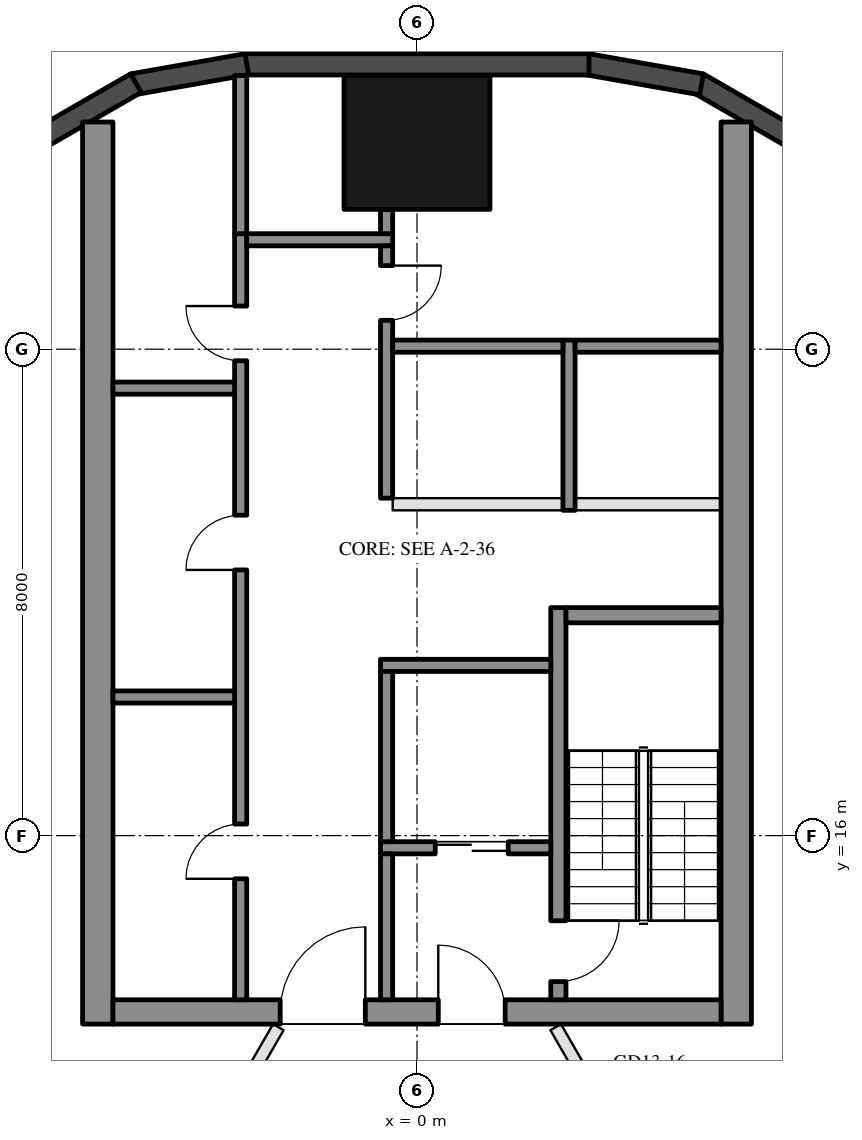
"""IFC4 building model, lengths in metres.
Left out: names, types, materials, properties, quantities, classifications, styles, units other than length and angle.
Written with IfcOpenShell. Run it as: python <this file> out.ifc"""

import sys

from ifc_helpers import new_model, si_unit, direction, frame, frame_2d, origin, origin_2d, place, context, subcontext, project, spatial, rectangle, hollow_rectangle, extrude, element, fill, save


model = new_model("IFC4")
c1 = context("Model", 3, precision=1e-05, world=origin(), true_north=direction((0.0, 1.0)))
c2 = subcontext(c1, "Body", "Model", "MODEL_VIEW")
j1 = project(units=[si_unit("LENGTHUNIT", "METRE"), si_unit("PLANEANGLEUNIT", "RADIAN")], contexts=[c1])
p1 = place(None, origin())
s1 = spatial("IfcSite", under=j1, at=p1, CompositionType="ELEMENT")
p2 = place(p1, origin())
s2 = spatial("IfcBuilding", under=s1, at=p2, CompositionType="ELEMENT")
p3 = place(p2, frame((0.0, 0.0, 157.7)))
s3 = spatial("IfcBuildingStorey", under=s2, at=p3, CompositionType="ELEMENT", Elevation=157.7)
p4 = place(p3, frame((0.0, 27.4, 0.0), z_axis=(0.0, 0.0, 1.0), x_axis=(1.0, 0.0, 0.0)))
e1 = element("IfcColumn", 1, at=p4, inside=s3, PredefinedType="COLUMN", context=c2, shape_type="SweptSolid", body=[
    extrude(hollow_rectangle(XDim=2.4, YDim=2.2, WallThickness=0.06, at=origin_2d()), origin(), (0.0, 0.0, 1.0), 3.7),
])
for number, where, z_axis, x_axis in (
    (2, (6.277, 27.422, 0.0), (0.0, 0.0, 1.0), (-0.866, 0.5, 0.0)),
    (3, (4.68, 28.356, 0.0), (0.0, 0.0, 1.0), (-0.985, 0.174, 0.0)),
):
    element("IfcWall", number, at=place(p3, frame(where, z_axis=z_axis, x_axis=x_axis)), inside=s3, PredefinedType="SOLIDWALL", context=c2, shape_type="SweptSolid", body=[
        extrude(rectangle(XDim=1.91, YDim=0.35, at=frame_2d((0.955, 0.0))), origin(), (0.0, 0.0, 1.0), 3.55),
    ])
p5 = place(p3, frame((2.829, 28.685, 0.0), z_axis=(0.0, 0.0, 1.0), x_axis=(-1.0, 0.0, 0.0)))
e4 = element("IfcWall", 4, at=p5, inside=s3, PredefinedType="SOLIDWALL", context=c2, shape_type="SweptSolid", body=[
    extrude(rectangle(XDim=5.658, YDim=0.35, at=frame_2d((2.829, 0.0))), origin(), (0.0, 0.0, 1.0), 3.55),
])
for number, where, z_axis, x_axis in (
    (5, (-2.799, 28.688, 0.0), (0.0, 0.0, 1.0), (-0.985, -0.174, 0.0)),
    (6, (-4.623, 28.377, 0.0), (0.0, 0.0, 1.0), (-0.866, -0.5, 0.0)),
):
    element("IfcWall", number, at=place(p3, frame(where, z_axis=z_axis, x_axis=x_axis)), inside=s3, PredefinedType="SOLIDWALL", context=c2, shape_type="SweptSolid", body=[
        extrude(rectangle(XDim=1.91, YDim=0.35, at=frame_2d((0.955, 0.0))), origin(), (0.0, 0.0, 1.0), 3.55),
    ])
for number, where, z_axis, x_axis in (
    (7, (5.25, 12.9, 0.0), (0.0, 0.0, 1.0), (0.0, 1.0, 0.0)),
    (8, (-5.25, 12.9, 0.0), (0.0, 0.0, 1.0), (0.0, 1.0, 0.0)),
):
    element("IfcWall", number, at=place(p3, frame(where, z_axis=z_axis, x_axis=x_axis)), inside=s3, PredefinedType="SHEAR", context=c2, shape_type="SweptSolid", body=[
        extrude(rectangle(XDim=14.837, YDim=0.5, at=frame_2d((7.418, 0.0))), origin(), (0.0, 0.0, 1.0), 3.5),
    ])
p6 = place(p3, frame((5.0, 13.1, 0.0), z_axis=(0.0, 0.0, 1.0), x_axis=(-1.0, 0.0, 0.0)))
e9 = element("IfcWall", 9, at=p6, inside=s3, PredefinedType="SHEAR", context=c2, shape_type="SweptSolid", body=[
    extrude(rectangle(XDim=10.0, YDim=0.4, at=frame_2d((5.0, 0.0))), origin(), (0.0, 0.0, 1.0), 3.5),
])
p7 = place(p6, frame((3.55, 0.0, 0.0)))
e10 = element("IfcOpeningElement", 10, at=p7, cuts=e9, PredefinedType="OPENING", context=c2, shape_type="SweptSolid", body=[
    extrude(rectangle(XDim=1.1, YDim=2.1, at=frame_2d((0.55, 1.05))), frame((0.0, 0.21, 0.0), z_axis=(0.0, -1.0, 0.0), x_axis=(1.0, 0.0, 0.0)), (0.0, 0.0, 1.0), 0.42),
])
p8 = place(p6, frame((5.85, 0.0, 0.0)))
e11 = element("IfcOpeningElement", 11, at=p8, cuts=e9, PredefinedType="OPENING", context=c2, shape_type="SweptSolid", body=[
    extrude(rectangle(XDim=1.4, YDim=2.1, at=frame_2d((0.7, 1.05))), frame((0.0, 0.21, 0.0), z_axis=(0.0, -1.0, 0.0), x_axis=(1.0, 0.0, 0.0)), (0.0, 0.0, 1.0), 0.42),
])
p9 = place(p3, frame((2.325, 13.3, 0.0), z_axis=(0.0, 0.0, 1.0), x_axis=(0.0, 1.0, 0.0)))
e12 = element("IfcWall", 12, at=p9, inside=s3, PredefinedType="SHEAR", context=c2, shape_type="SweptSolid", body=[
    extrude(rectangle(XDim=6.45, YDim=0.25, at=frame_2d((3.225, 0.0))), origin(), (0.0, 0.0, 1.0), 3.5),
])
p10 = place(p9, frame((0.3, 0.0, 0.0)))
e13 = element("IfcOpeningElement", 13, at=p10, cuts=e12, PredefinedType="OPENING", context=c2, shape_type="SweptSolid", body=[
    extrude(rectangle(XDim=1.0, YDim=2.1, at=frame_2d((0.5, 1.05))), frame((0.0, 0.135, 0.0), z_axis=(0.0, -1.0, 0.0), x_axis=(1.0, 0.0, 0.0)), (0.0, 0.0, 1.0), 0.27),
])
p11 = place(p3, frame((5.0, 19.625, 0.0), z_axis=(0.0, 0.0, 1.0), x_axis=(-1.0, 0.0, 0.0)))
e14 = element("IfcWall", 14, at=p11, inside=s3, PredefinedType="SHEAR", context=c2, shape_type="SweptSolid", body=[
    extrude(rectangle(XDim=2.55, YDim=0.25, at=frame_2d((1.275, 0.0))), origin(), (0.0, 0.0, 1.0), 3.5),
])
p12 = place(p3, frame((2.2, 18.8, 0.0), z_axis=(0.0, 0.0, 1.0), x_axis=(-1.0, 0.0, 0.0)))
e15 = element("IfcWall", 15, at=p12, inside=s3, PredefinedType="SHEAR", context=c2, shape_type="SweptSolid", body=[
    extrude(rectangle(XDim=2.8, YDim=0.2, at=frame_2d((1.4, 0.0))), origin(), (0.0, 0.0, 1.0), 3.5),
])
p13 = place(p3, frame((2.2, 15.8, 0.0), z_axis=(0.0, 0.0, 1.0), x_axis=(-1.0, 0.0, 0.0)))
e16 = element("IfcWall", 16, at=p13, inside=s3, PredefinedType="SHEAR", context=c2, shape_type="SweptSolid", body=[
    extrude(rectangle(XDim=2.8, YDim=0.2, at=frame_2d((1.4, 0.0))), origin(), (0.0, 0.0, 1.0), 3.5),
])
p14 = place(p13, frame((0.7, 0.0, 0.0)))
e17 = element("IfcOpeningElement", 17, at=p14, cuts=e16, PredefinedType="OPENING", context=c2, shape_type="SweptSolid", body=[
    extrude(rectangle(XDim=1.2, YDim=2.1, at=frame_2d((0.6, 1.05))), frame((0.0, 0.11, 0.0), z_axis=(0.0, -1.0, 0.0), x_axis=(1.0, 0.0, 0.0)), (0.0, 0.0, 1.0), 0.22),
])
p15 = place(p3, frame((-0.5, 15.9, 0.0), z_axis=(0.0, 0.0, 1.0), x_axis=(0.0, 1.0, 0.0)))
e18 = element("IfcWall", 18, at=p15, inside=s3, PredefinedType="SHEAR", context=c2, shape_type="SweptSolid", body=[
    extrude(rectangle(XDim=2.8, YDim=0.2, at=frame_2d((1.4, 0.0))), origin(), (0.0, 0.0, 1.0), 3.5),
])
p16 = place(p3, frame((-0.5, 13.3, 0.0), z_axis=(0.0, 0.0, 1.0), x_axis=(0.0, 1.0, 0.0)))
e19 = element("IfcWall", 19, at=p16, inside=s3, PredefinedType="SHEAR", context=c2, shape_type="SweptSolid", body=[
    extrude(rectangle(XDim=2.4, YDim=0.2, at=frame_2d((1.2, 0.0))), origin(), (0.0, 0.0, 1.0), 3.5),
])
p17 = place(p3, frame((-2.9, 13.3, 0.0), z_axis=(0.0, 0.0, 1.0), x_axis=(0.0, 1.0, 0.0)))
e20 = element("IfcWall", 20, at=p17, inside=s3, PredefinedType="SHEAR", context=c2, shape_type="SweptSolid", body=[
    extrude(rectangle(XDim=12.6, YDim=0.2, at=frame_2d((6.3, 0.0))), origin(), (0.0, 0.0, 1.0), 3.5),
])
p18 = place(p17, frame((1.99, 0.0, 0.0)))
e21 = element("IfcOpeningElement", 21, at=p18, cuts=e20, PredefinedType="OPENING", context=c2, shape_type="SweptSolid", body=[
    extrude(rectangle(XDim=0.9, YDim=2.1, at=frame_2d((0.45, 1.05))), frame((0.0, 0.11, 0.0), z_axis=(0.0, -1.0, 0.0), x_axis=(1.0, 0.0, 0.0)), (0.0, 0.0, 1.0), 0.22),
])
p19 = place(p17, frame((7.07, 0.0, 0.0)))
e22 = element("IfcOpeningElement", 22, at=p19, cuts=e20, PredefinedType="OPENING", context=c2, shape_type="SweptSolid", body=[
    extrude(rectangle(XDim=0.9, YDim=2.1, at=frame_2d((0.45, 1.05))), frame((0.0, 0.11, 0.0), z_axis=(0.0, -1.0, 0.0), x_axis=(1.0, 0.0, 0.0)), (0.0, 0.0, 1.0), 0.22),
])
p20 = place(p17, frame((10.51, 0.0, 0.0)))
e23 = element("IfcOpeningElement", 23, at=p20, cuts=e20, PredefinedType="OPENING", context=c2, shape_type="SweptSolid", body=[
    extrude(rectangle(XDim=0.9, YDim=2.1, at=frame_2d((0.45, 1.05))), frame((0.0, 0.11, 0.0), z_axis=(0.0, -1.0, 0.0), x_axis=(1.0, 0.0, 0.0)), (0.0, 0.0, 1.0), 0.22),
])
p21 = place(p3, frame((-0.4, 25.8, 0.0), z_axis=(0.0, 0.0, 1.0), x_axis=(-1.0, 0.0, 0.0)))
e24 = element("IfcWall", 24, at=p21, inside=s3, PredefinedType="SHEAR", context=c2, shape_type="SweptSolid", body=[
    extrude(rectangle(XDim=2.4, YDim=0.2, at=frame_2d((1.2, 0.0))), origin(), (0.0, 0.0, 1.0), 3.5),
])
p22 = place(p3, frame((-0.5, 21.55, 0.0), z_axis=(0.0, 0.0, 1.0), x_axis=(0.0, 1.0, 0.0)))
e25 = element("IfcWall", 25, at=p22, inside=s3, PredefinedType="SHEAR", context=c2, shape_type="SweptSolid", body=[
    extrude(rectangle(XDim=4.15, YDim=0.2, at=frame_2d((2.075, 0.0))), origin(), (0.0, 0.0, 1.0), 3.5),
])
p23 = place(p22, frame((2.925, 0.0, 0.0)))
e26 = element("IfcOpeningElement", 26, at=p23, cuts=e25, PredefinedType="OPENING", context=c2, shape_type="SweptSolid", body=[
    extrude(rectangle(XDim=0.9, YDim=2.1, at=frame_2d((0.45, 1.05))), frame((0.0, 0.11, 0.0), z_axis=(0.0, -1.0, 0.0), x_axis=(1.0, 0.0, 0.0)), (0.0, 0.0, 1.0), 0.22),
])
for number, where, z_axis, x_axis in (
    (27, (-3.0, 18.28, 0.0), (0.0, 0.0, 1.0), (-1.0, 0.0, 0.0)),
    (28, (-3.0, 23.36, 0.0), (0.0, 0.0, 1.0), (-1.0, 0.0, 0.0)),
):
    element("IfcWall", number, at=place(p3, frame(where, z_axis=z_axis, x_axis=x_axis)), inside=s3, PredefinedType="SHEAR", context=c2, shape_type="SweptSolid", body=[
        extrude(rectangle(XDim=2.0, YDim=0.2, at=frame_2d((1.0, 0.0))), origin(), (0.0, 0.0, 1.0), 3.5),
    ])
p24 = place(p3, frame((-0.5, 25.9, 0.0), z_axis=(0.0, 0.0, 1.0), x_axis=(0.0, 1.0, 0.0)))
e29 = element("IfcWall", 29, at=p24, inside=s3, PredefinedType="SHEAR", context=c2, shape_type="SweptSolid", body=[
    extrude(rectangle(XDim=0.4, YDim=0.2, at=frame_2d((0.2, 0.0))), origin(), (0.0, 0.0, 1.0), 3.5),
])
p25 = place(p3, frame((-2.9, 25.9, 0.0), z_axis=(0.0, 0.0, 1.0), x_axis=(0.0, 1.0, 0.0)))
e30 = element("IfcWall", 30, at=p25, inside=s3, PredefinedType="SHEAR", context=c2, shape_type="SweptSolid", body=[
    extrude(rectangle(XDim=2.6, YDim=0.2, at=frame_2d((1.3, 0.0))), origin(), (0.0, 0.0, 1.0), 3.5),
])
p26 = place(p3, frame((2.5, 21.35, 0.0), z_axis=(0.0, 0.0, 1.0), x_axis=(0.0, 1.0, 0.0)))
e31 = element("IfcWall", 31, at=p26, inside=s3, PredefinedType="SHEAR", context=c2, shape_type="SweptSolid", body=[
    extrude(rectangle(XDim=2.8, YDim=0.2, at=frame_2d((1.4, 0.0))), origin(), (0.0, 0.0, 1.0), 3.5),
])
p27 = place(p3, frame((5.0, 24.05, 0.0), z_axis=(0.0, 0.0, 1.0), x_axis=(-1.0, 0.0, 0.0)))
e32 = element("IfcWall", 32, at=p27, inside=s3, PredefinedType="SHEAR", context=c2, shape_type="SweptSolid", body=[
    extrude(rectangle(XDim=2.4, YDim=0.2, at=frame_2d((1.2, 0.0))), origin(), (0.0, 0.0, 1.0), 3.5),
])
p28 = place(p3, frame((2.4, 24.05, 0.0), z_axis=(0.0, 0.0, 1.0), x_axis=(-1.0, 0.0, 0.0)))
e33 = element("IfcWall", 33, at=p28, inside=s3, PredefinedType="SHEAR", context=c2, shape_type="SweptSolid", body=[
    extrude(rectangle(XDim=2.8, YDim=0.2, at=frame_2d((1.4, 0.0))), origin(), (0.0, 0.0, 1.0), 3.5),
])
p29 = place(p3, frame((5.0, 21.45, 0.0), z_axis=(0.0, 0.0, 1.0), x_axis=(-1.0, 0.0, 0.0)))
e34 = element("IfcWall", 34, at=p29, inside=s3, PredefinedType="PARTITIONING", context=c2, shape_type="SweptSolid", body=[
    extrude(rectangle(XDim=2.4, YDim=0.2, at=frame_2d((1.2, 0.0))), origin(), (0.0, 0.0, 1.0), 3.5),
])
p30 = place(p3, frame((2.4, 21.45, 0.0), z_axis=(0.0, 0.0, 1.0), x_axis=(-1.0, 0.0, 0.0)))
e35 = element("IfcWall", 35, at=p30, inside=s3, PredefinedType="PARTITIONING", context=c2, shape_type="SweptSolid", body=[
    extrude(rectangle(XDim=2.8, YDim=0.2, at=frame_2d((1.4, 0.0))), origin(), (0.0, 0.0, 1.0), 3.5),
])
p31 = place(p3, frame((14.257, 13.866, 0.0), z_axis=(0.0, 0.0, 1.0), x_axis=(-0.916761733334, -0.399434505638, 0.0)))
e36 = element("IfcWall", 36, at=p31, inside=s3, PredefinedType="PARTITIONING", context=c2, shape_type="SweptSolid", body=[
    extrude(rectangle(XDim=11.05, YDim=0.2, at=frame_2d((5.525, 0.0))), origin(), (0.0, 0.0, 1.0), 3.06),
])
p32 = place(p3, frame((-13.672, 13.08, 0.0), z_axis=(0.0, 0.0, 1.0), x_axis=(0.912311972773, -0.409495866077, 0.0)))
e37 = element("IfcWall", 37, at=p32, inside=s3, PredefinedType="PARTITIONING", context=c2, shape_type="SweptSolid", body=[
    extrude(rectangle(XDim=10.132, YDim=0.2, at=frame_2d((5.066, 0.0))), origin(), (0.0, 0.0, 1.0), 3.06),
])
p33 = place(p3, frame((2.281, 12.85, 0.0), z_axis=(0.0, 0.0, 1.0), x_axis=(0.499991068497, -0.866030560329, 0.0)))
e38 = element("IfcWall", 38, at=p33, inside=s3, PredefinedType="PARTITIONING", context=c2, shape_type="SweptSolid", body=[
    extrude(rectangle(XDim=3.776, YDim=0.2, at=frame_2d((1.888, 0.0))), origin(), (0.0, 0.0, 1.0), 2.95),
])
p34 = place(p33, frame((1.388, 0.0, 0.0)))
e39 = element("IfcOpeningElement", 39, at=p34, cuts=e38, PredefinedType="OPENING", context=c2, shape_type="SweptSolid", body=[
    extrude(rectangle(XDim=1.0, YDim=2.1, at=frame_2d((0.5, 1.05))), frame((0.0, 0.11, 0.0), z_axis=(0.0, -1.0, 0.0), x_axis=(1.0, 0.0, 0.0)), (0.0, 0.0, 1.0), 0.22),
])
p35 = place(p3, frame((-4.469, 9.059, 0.0), z_axis=(0.0, 0.0, 1.0), x_axis=(0.499996027077, 0.86602769754, 0.0)))
e40 = element("IfcWall", 40, at=p35, inside=s3, PredefinedType="PARTITIONING", context=c2, shape_type="SweptSolid", body=[
    extrude(rectangle(XDim=4.377, YDim=0.2, at=frame_2d((2.189, 0.0))), origin(), (0.0, 0.0, 1.0), 2.95),
])
p36 = place(p35, frame((1.689, 0.0, 0.0)))
e41 = element("IfcOpeningElement", 41, at=p36, cuts=e40, PredefinedType="OPENING", context=c2, shape_type="SweptSolid", body=[
    extrude(rectangle(XDim=1.0, YDim=2.1, at=frame_2d((0.5, 1.05))), frame((0.0, 0.11, 0.0), z_axis=(0.0, -1.0, 0.0), x_axis=(1.0, 0.0, 0.0)), (0.0, 0.0, 1.0), 0.22),
])
p37 = place(p14, origin())
e42 = element("IfcDoor", 42, at=p37, inside=s3, OperationType="DOUBLE_DOOR_SLIDING", PredefinedType="DOOR", context=c2, shape_type="SweptSolid", body=[
    extrude(rectangle(XDim=1.2, YDim=2.1, at=frame_2d((0.6, 1.05))), frame((0.0, 0.025, 0.0), z_axis=(0.0, -1.0, 0.0), x_axis=(1.0, 0.0, 0.0)), (0.0, 0.0, 1.0), 0.05),
])
fill(e17, e42)
p38 = place(p18, origin())
e43 = element("IfcDoor", 43, at=p38, inside=s3, OperationType="SINGLE_SWING_LEFT", PredefinedType="DOOR", context=c2, shape_type="SweptSolid", body=[
    extrude(rectangle(XDim=0.9, YDim=2.1, at=frame_2d((0.45, 1.05))), frame((0.0, 0.025, 0.0), z_axis=(0.0, -1.0, 0.0), x_axis=(1.0, 0.0, 0.0)), (0.0, 0.0, 1.0), 0.05),
])
fill(e21, e43)
p39 = place(p19, origin())
e44 = element("IfcDoor", 44, at=p39, inside=s3, OperationType="SINGLE_SWING_LEFT", PredefinedType="DOOR", context=c2, shape_type="SweptSolid", body=[
    extrude(rectangle(XDim=0.9, YDim=2.1, at=frame_2d((0.45, 1.05))), frame((0.0, 0.025, 0.0), z_axis=(0.0, -1.0, 0.0), x_axis=(1.0, 0.0, 0.0)), (0.0, 0.0, 1.0), 0.05),
])
fill(e22, e44)
p40 = place(p20, origin())
e45 = element("IfcDoor", 45, at=p40, inside=s3, OperationType="SINGLE_SWING_RIGHT", PredefinedType="DOOR", context=c2, shape_type="SweptSolid", body=[
    extrude(rectangle(XDim=0.9, YDim=2.1, at=frame_2d((0.45, 1.05))), frame((0.0, 0.025, 0.0), z_axis=(0.0, -1.0, 0.0), x_axis=(1.0, 0.0, 0.0)), (0.0, 0.0, 1.0), 0.05),
])
fill(e23, e45)
p41 = place(p23, frame((0.9, 0.0, 0.0), z_axis=(0.0, 0.0, 1.0), x_axis=(-1.0, 0.0, 0.0)))
e46 = element("IfcDoor", 46, at=p41, inside=s3, OperationType="SINGLE_SWING_LEFT", PredefinedType="DOOR", context=c2, shape_type="SweptSolid", body=[
    extrude(rectangle(XDim=0.9, YDim=2.1, at=frame_2d((0.45, 1.05))), frame((0.0, 0.025, 0.0), z_axis=(0.0, -1.0, 0.0), x_axis=(1.0, 0.0, 0.0)), (0.0, 0.0, 1.0), 0.05),
])
fill(e26, e46)
p42 = place(p7, frame((1.1, 0.0, 0.0), z_axis=(0.0, 0.0, 1.0), x_axis=(-1.0, 0.0, 0.0)))
e47 = element("IfcDoor", 47, at=p42, inside=s3, OperationType="SINGLE_SWING_LEFT", PredefinedType="DOOR", context=c2, shape_type="SweptSolid", body=[
    extrude(rectangle(XDim=1.1, YDim=2.1, at=frame_2d((0.55, 1.05))), frame((0.0, 0.025, 0.0), z_axis=(0.0, -1.0, 0.0), x_axis=(1.0, 0.0, 0.0)), (0.0, 0.0, 1.0), 0.05),
])
fill(e10, e47)
p43 = place(p8, frame((1.4, 0.0, 0.0), z_axis=(0.0, 0.0, 1.0), x_axis=(-1.0, 0.0, 0.0)))
e48 = element("IfcDoor", 48, at=p43, inside=s3, OperationType="DOUBLE_DOOR_SINGLE_SWING", PredefinedType="DOOR", context=c2, shape_type="SweptSolid", body=[
    extrude(rectangle(XDim=1.4, YDim=2.1, at=frame_2d((0.7, 1.05))), frame((0.0, 0.025, 0.0), z_axis=(0.0, -1.0, 0.0), x_axis=(1.0, 0.0, 0.0)), (0.0, 0.0, 1.0), 0.05),
])
fill(e11, e48)
p44 = place(p10, frame((1.0, 0.0, 0.0), z_axis=(0.0, 0.0, 1.0), x_axis=(-1.0, 0.0, 0.0)))
e49 = element("IfcDoor", 49, at=p44, inside=s3, OperationType="SINGLE_SWING_LEFT", PredefinedType="DOOR", context=c2, shape_type="SweptSolid", body=[
    extrude(rectangle(XDim=1.0, YDim=2.1, at=frame_2d((0.5, 1.05))), frame((0.0, 0.025, 0.0), z_axis=(0.0, -1.0, 0.0), x_axis=(1.0, 0.0, 0.0)), (0.0, 0.0, 1.0), 0.05),
])
fill(e13, e49)
save(model, sys.argv[1])
